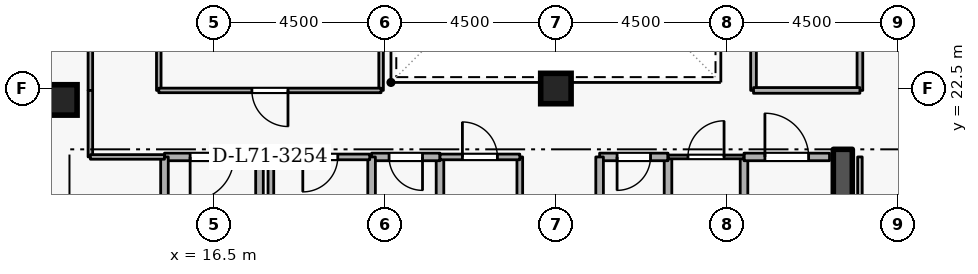
"""IFC4 building model, lengths in metres.
Left out: names, types, materials, properties, quantities, classifications, styles, units other than length and angle.
Written with IfcOpenShell. Run it as: python <this file> out.ifc"""

import sys

from ifc_helpers import new_model, si_unit, direction, frame, frame_2d, origin, origin_2d, place, context, subcontext, project, spatial, rectangle, extrude, element, fill, save


model = new_model("IFC4")
c1 = context("Model", 3, precision=1e-05, world=origin(), true_north=direction((0.0, 1.0)))
c2 = subcontext(c1, "Body", "Model", "MODEL_VIEW")
j1 = project(units=[si_unit("LENGTHUNIT", "METRE"), si_unit("PLANEANGLEUNIT", "RADIAN")], contexts=[c1])
p1 = place(None, origin())
s1 = spatial("IfcSite", under=j1, at=p1, CompositionType="ELEMENT")
p2 = place(p1, origin())
s2 = spatial("IfcBuilding", under=s1, at=p2, CompositionType="ELEMENT")
p3 = place(p2, frame((0.0, 0.0, 265.5)))
s3 = spatial("IfcBuildingStorey", under=s2, at=p3, CompositionType="ELEMENT", Elevation=265.5)
p4 = place(p3, frame((33.05, 15.1, 0.0), z_axis=(0.0, 0.0, 1.0), x_axis=(0.0, 1.0, 0.0)))
e1 = element("IfcWall", 1, at=p4, inside=s3, PredefinedType="SHEAR", context=c2, shape_type="SweptSolid", body=[
    extrude(rectangle(XDim=5.8, YDim=0.5, at=frame_2d((2.9, 0.0))), origin(), (0.0, 0.0, 1.0), 3.6),
])
for number, where, z_axis, x_axis in (
    (2, (12.5, 22.2, 0.0), (0.0, 0.0, 1.0), (1.0, 0.0, 0.0)),
    (3, (25.5, 22.5, 0.0), (0.0, 0.0, 1.0), (1.0, 0.0, 0.0)),
):
    element("IfcColumn", number, at=place(p3, frame(where, z_axis=z_axis, x_axis=x_axis)), inside=s3, PredefinedType="COLUMN", context=c2, shape_type="SweptSolid", body=[
        extrude(rectangle(XDim=0.8, YDim=0.8, at=origin_2d()), origin(), (0.0, 0.0, 1.0), 3.6),
    ])
p5 = place(p3, frame((17.7, 18.4, 0.0), z_axis=(0.0, 0.0, 1.0), x_axis=(0.0, 1.0, 0.0)))
e4 = element("IfcWall", 4, at=p5, inside=s3, PredefinedType="STANDARD", context=c2, shape_type="SweptSolid", body=[
    extrude(rectangle(XDim=2.3, YDim=0.2, at=frame_2d((1.15, 0.0))), origin(), (0.0, 0.0, 1.0), 2.545),
])
p6 = place(p3, frame((17.7, 20.7, 0.0), z_axis=(0.0, 0.0, 1.0), x_axis=(-1.0, 0.0, 0.0)))
e5 = element("IfcWall", 5, at=p6, inside=s3, PredefinedType="STANDARD", context=c2, shape_type="SweptSolid", body=[
    extrude(rectangle(XDim=2.5, YDim=0.2, at=frame_2d((1.25, 0.0))), origin(), (0.0, 0.0, 1.0), 3.34),
])
p7 = place(p6, frame((0.675, 0.0, 0.0)))
e6 = element("IfcOpeningElement", 6, at=p7, cuts=e5, PredefinedType="OPENING", context=c2, shape_type="SweptSolid", body=[
    extrude(rectangle(XDim=1.15, YDim=2.1, at=frame_2d((0.575, 1.05))), frame((0.0, 0.11, 0.0), z_axis=(0.0, -1.0, 0.0), x_axis=(1.0, 0.0, 0.0)), (0.0, 0.0, 1.0), 0.22),
])
p8 = place(p3, frame((15.2, 20.7, 0.0), z_axis=(0.0, 0.0, 1.0), x_axis=(0.0, -1.0, 0.0)))
e7 = element("IfcWall", 7, at=p8, inside=s3, PredefinedType="STANDARD", context=c2, shape_type="SweptSolid", body=[
    extrude(rectangle(XDim=5.7, YDim=0.2, at=frame_2d((2.85, 0.0))), origin(), (0.0, 0.0, 1.0), 3.34),
])
p9 = place(p3, frame((28.45, 18.65, 0.0), z_axis=(0.0, 0.0, 1.0), x_axis=(0.0, 1.0, 0.0)))
e8 = element("IfcWall", 8, at=p9, inside=s3, PredefinedType="STANDARD", context=c2, shape_type="SweptSolid", body=[
    extrude(rectangle(XDim=2.05, YDim=0.2, at=frame_2d((1.025, 0.0))), origin(), (0.0, 0.0, 1.0), 3.34),
])
p10 = place(p3, frame((28.45, 20.7, 0.0), z_axis=(0.0, 0.0, 1.0), x_axis=(-1.0, 0.0, 0.0)))
e9 = element("IfcWall", 9, at=p10, inside=s3, PredefinedType="STANDARD", context=c2, shape_type="SweptSolid", body=[
    extrude(rectangle(XDim=1.8, YDim=0.2, at=frame_2d((0.9, 0.0))), origin(), (0.0, 0.0, 1.0), 3.34),
])
p11 = place(p10, frame((0.46, 0.0, 0.0)))
e10 = element("IfcOpeningElement", 10, at=p11, cuts=e9, PredefinedType="OPENING", context=c2, shape_type="SweptSolid", body=[
    extrude(rectangle(XDim=0.88, YDim=2.04, at=frame_2d((0.44, 1.02))), frame((0.0, 0.11, 0.0), z_axis=(0.0, -1.0, 0.0), x_axis=(1.0, 0.0, 0.0)), (0.0, 0.0, 1.0), 0.22),
])
for number, where, z_axis, x_axis in (
    (11, (26.65, 20.7, 0.0), (0.0, 0.0, 1.0), (0.0, -1.0, 0.0)),
    (12, (22.45, 18.65, 0.0), (0.0, 0.0, 1.0), (0.0, 1.0, 0.0)),
):
    element("IfcWall", number, at=place(p3, frame(where, z_axis=z_axis, x_axis=x_axis)), inside=s3, PredefinedType="STANDARD", context=c2, shape_type="SweptSolid", body=[
        extrude(rectangle(XDim=2.05, YDim=0.2, at=frame_2d((1.025, 0.0))), origin(), (0.0, 0.0, 1.0), 3.34),
    ])
p12 = place(p3, frame((22.45, 20.7, 0.0), z_axis=(0.0, 0.0, 1.0), x_axis=(-1.0, 0.0, 0.0)))
e13 = element("IfcWall", 13, at=p12, inside=s3, PredefinedType="STANDARD", context=c2, shape_type="SweptSolid", body=[
    extrude(rectangle(XDim=1.8, YDim=0.2, at=frame_2d((0.9, 0.0))), origin(), (0.0, 0.0, 1.0), 3.34),
])
p13 = place(p12, frame((0.46, 0.0, 0.0)))
e14 = element("IfcOpeningElement", 14, at=p13, cuts=e13, PredefinedType="OPENING", context=c2, shape_type="SweptSolid", body=[
    extrude(rectangle(XDim=0.88, YDim=2.04, at=frame_2d((0.44, 1.02))), frame((0.0, 0.11, 0.0), z_axis=(0.0, -1.0, 0.0), x_axis=(1.0, 0.0, 0.0)), (0.0, 0.0, 1.0), 0.22),
])
for number, where, z_axis, x_axis in (
    (15, (20.65, 20.7, 0.0), (0.0, 0.0, 1.0), (0.0, -1.0, 0.0)),
    (16, (30.45, 18.65, 0.0), (0.0, 0.0, 1.0), (0.0, 1.0, 0.0)),
):
    element("IfcWall", number, at=place(p3, frame(where, z_axis=z_axis, x_axis=x_axis)), inside=s3, PredefinedType="STANDARD", context=c2, shape_type="SweptSolid", body=[
        extrude(rectangle(XDim=2.05, YDim=0.2, at=frame_2d((1.025, 0.0))), origin(), (0.0, 0.0, 1.0), 3.34),
    ])
p14 = place(p3, frame((30.45, 20.7, 0.0), z_axis=(0.0, 0.0, 1.0), x_axis=(1.0, 0.0, 0.0)))
e17 = element("IfcWall", 17, at=p14, inside=s3, PredefinedType="STANDARD", context=c2, shape_type="SweptSolid", body=[
    extrude(rectangle(XDim=2.25, YDim=0.2, at=frame_2d((1.125, 0.0))), origin(), (0.0, 0.0, 1.0), 3.34),
])
p15 = place(p14, frame((0.55, 0.0, 0.0)))
e18 = element("IfcOpeningElement", 18, at=p15, cuts=e17, PredefinedType="OPENING", context=c2, shape_type="SweptSolid", body=[
    extrude(rectangle(XDim=1.15, YDim=2.1, at=frame_2d((0.575, 1.05))), frame((0.0, 0.11, 0.0), z_axis=(0.0, -1.0, 0.0), x_axis=(1.0, 0.0, 0.0)), (0.0, 0.0, 1.0), 0.22),
])
p16 = place(p3, frame((20.6, 20.7, 0.0), z_axis=(0.0, 0.0, 1.0), x_axis=(-1.0, 0.0, 0.0)))
e19 = element("IfcWall", 19, at=p16, inside=s3, PredefinedType="PARTITIONING", context=c2, shape_type="SweptSolid", body=[
    extrude(rectangle(XDim=2.6, YDim=0.15, at=frame_2d((1.3, 0.0))), origin(), (0.0, 0.0, 1.0), 3.34),
])
p17 = place(p16, frame((0.84, 0.0, 0.0)))
e20 = element("IfcOpeningElement", 20, at=p17, cuts=e19, PredefinedType="OPENING", context=c2, shape_type="SweptSolid", body=[
    extrude(rectangle(XDim=0.92, YDim=2.08, at=frame_2d((0.46, 1.04))), frame((0.0, 0.085, 0.0), z_axis=(0.0, -1.0, 0.0), x_axis=(1.0, 0.0, 0.0)), (0.0, 0.0, 1.0), 0.17),
])
p18 = place(p3, frame((18.0, 20.7, 0.0), z_axis=(0.0, 0.0, 1.0), x_axis=(0.0, -1.0, 0.0)))
e21 = element("IfcWall", 21, at=p18, inside=s3, PredefinedType="PARTITIONING", context=c2, shape_type="SweptSolid", body=[
    extrude(rectangle(XDim=2.05, YDim=0.15, at=frame_2d((1.025, 0.0))), origin(), (0.0, 0.0, 1.0), 2.545),
])
p19 = place(p3, frame((24.55, 20.7, 0.0), z_axis=(0.0, 0.0, 1.0), x_axis=(0.0, -1.0, 0.0)))
e22 = element("IfcWall", 22, at=p19, inside=s3, PredefinedType="PARTITIONING", context=c2, shape_type="SweptSolid", body=[
    extrude(rectangle(XDim=2.05, YDim=0.15, at=frame_2d((1.025, 0.0))), origin(), (0.0, 0.0, 1.0), 3.34),
])
p20 = place(p3, frame((22.45, 20.7, 0.0), z_axis=(0.0, 0.0, 1.0), x_axis=(1.0, 0.0, 0.0)))
e23 = element("IfcWall", 23, at=p20, inside=s3, PredefinedType="PARTITIONING", context=c2, shape_type="SweptSolid", body=[
    extrude(rectangle(XDim=2.1, YDim=0.15, at=frame_2d((1.05, 0.0))), origin(), (0.0, 0.0, 1.0), 3.34),
])
p21 = place(p20, frame((0.59, 0.0, 0.0)))
e24 = element("IfcOpeningElement", 24, at=p21, cuts=e23, PredefinedType="OPENING", context=c2, shape_type="SweptSolid", body=[
    extrude(rectangle(XDim=0.92, YDim=2.08, at=frame_2d((0.46, 1.04))), frame((0.0, 0.085, 0.0), z_axis=(0.0, -1.0, 0.0), x_axis=(1.0, 0.0, 0.0)), (0.0, 0.0, 1.0), 0.17),
])
p22 = place(p3, frame((28.45, 20.7, 0.0), z_axis=(0.0, 0.0, 1.0), x_axis=(1.0, 0.0, 0.0)))
e25 = element("IfcWall", 25, at=p22, inside=s3, PredefinedType="PARTITIONING", context=c2, shape_type="SweptSolid", body=[
    extrude(rectangle(XDim=2.0, YDim=0.1, at=frame_2d((1.0, 0.0))), origin(), (0.0, 0.0, 1.0), 3.34),
])
p23 = place(p22, frame((0.525, 0.0, 0.0)))
e26 = element("IfcOpeningElement", 26, at=p23, cuts=e25, PredefinedType="OPENING", context=c2, shape_type="SweptSolid", body=[
    extrude(rectangle(XDim=0.95, YDim=2.1, at=frame_2d((0.475, 1.05))), frame((0.0, 0.06, 0.0), z_axis=(0.0, -1.0, 0.0), x_axis=(1.0, 0.0, 0.0)), (0.0, 0.0, 1.0), 0.12),
])
p24 = place(p3, frame((33.5, 20.7, 0.0), z_axis=(0.0, 0.0, 1.0), x_axis=(0.0, -1.0, 0.0)))
e27 = element("IfcWall", 27, at=p24, inside=s3, PredefinedType="PARTITIONING", context=c2, shape_type="SweptSolid", body=[
    extrude(rectangle(XDim=5.9, YDim=0.12, at=frame_2d((2.95, 0.0))), origin(), (0.0, 0.0, 1.0), 3.34),
])
p25 = place(p3, frame((13.25, 28.2, 0.0), z_axis=(0.0, 0.0, 1.0), x_axis=(0.0, -1.0, 0.0)))
e28 = element("IfcWall", 28, at=p25, inside=s3, PredefinedType="PARTITIONING", context=c2, shape_type="SweptSolid", body=[
    extrude(rectangle(XDim=5.75, YDim=0.12, at=frame_2d((2.875, 0.0))), origin(), (0.0, 0.0, 1.0), 3.34),
])
p26 = place(p25, frame((2.35, 0.0, 0.0)))
e29 = element("IfcOpeningElement", 29, at=p26, cuts=e28, PredefinedType="OPENING", context=c2, shape_type="SweptSolid", body=[
    extrude(rectangle(XDim=1.05, YDim=2.1, at=frame_2d((0.525, 1.05))), frame((0.0, 0.07, 0.0), z_axis=(0.0, -1.0, 0.0), x_axis=(1.0, 0.0, 0.0)), (0.0, 0.0, 1.0), 0.14),
])
p27 = place(p3, frame((13.25, 22.45, 0.0), z_axis=(0.0, 0.0, 1.0), x_axis=(0.0, -1.0, 0.0)))
e30 = element("IfcWall", 30, at=p27, inside=s3, PredefinedType="PARTITIONING", context=c2, shape_type="SweptSolid", body=[
    extrude(rectangle(XDim=1.75, YDim=0.12, at=frame_2d((0.875, 0.0))), origin(), (0.0, 0.0, 1.0), 3.34),
])
p28 = place(p3, frame((13.25, 20.7, 0.0), z_axis=(0.0, 0.0, 1.0), x_axis=(1.0, 0.0, 0.0)))
e31 = element("IfcWall", 31, at=p28, inside=s3, PredefinedType="PARTITIONING", context=c2, shape_type="SweptSolid", body=[
    extrude(rectangle(XDim=1.95, YDim=0.12, at=frame_2d((0.975, 0.0))), origin(), (0.0, 0.0, 1.0), 3.34),
])
for number, where, z_axis, x_axis in (
    (32, (15.05, 22.45, 0.0), (0.0, 0.0, 1.0), (0.0, 1.0, 0.0)),
    (33, (20.9, 28.2, 0.0), (0.0, 0.0, 1.0), (0.0, -1.0, 0.0)),
):
    element("IfcWall", number, at=place(p3, frame(where, z_axis=z_axis, x_axis=x_axis)), inside=s3, PredefinedType="PARTITIONING", context=c2, shape_type="SweptSolid", body=[
        extrude(rectangle(XDim=5.75, YDim=0.12, at=frame_2d((2.875, 0.0))), origin(), (0.0, 0.0, 1.0), 3.34),
    ])
p29 = place(p3, frame((20.9, 22.45, 0.0), z_axis=(0.0, 0.0, 1.0), x_axis=(-1.0, 0.0, 0.0)))
e34 = element("IfcWall", 34, at=p29, inside=s3, PredefinedType="PARTITIONING", context=c2, shape_type="SweptSolid", body=[
    extrude(rectangle(XDim=5.85, YDim=0.12, at=frame_2d((2.925, 0.0))), origin(), (0.0, 0.0, 1.0), 3.34),
])
p30 = place(p29, frame((2.45, 0.0, 0.0)))
e35 = element("IfcOpeningElement", 35, at=p30, cuts=e34, PredefinedType="OPENING", context=c2, shape_type="SweptSolid", body=[
    extrude(rectangle(XDim=0.95, YDim=2.1, at=frame_2d((0.475, 1.05))), frame((0.0, 0.07, 0.0), z_axis=(0.0, -1.0, 0.0), x_axis=(1.0, 0.0, 0.0)), (0.0, 0.0, 1.0), 0.14),
])
p31 = place(p3, frame((30.7, 22.45, 0.0), z_axis=(0.0, 0.0, 1.0), x_axis=(0.0, 1.0, 0.0)))
e36 = element("IfcWall", 36, at=p31, inside=s3, PredefinedType="PARTITIONING", context=c2, shape_type="SweptSolid", body=[
    extrude(rectangle(XDim=4.55, YDim=0.15, at=frame_2d((2.275, 0.0))), origin(), (0.0, 0.0, 1.0), 3.34),
])
p32 = place(p3, frame((33.5, 27.0, 0.0), z_axis=(0.0, 0.0, 1.0), x_axis=(0.0, -1.0, 0.0)))
e37 = element("IfcWall", 37, at=p32, inside=s3, PredefinedType="PARTITIONING", context=c2, shape_type="SweptSolid", body=[
    extrude(rectangle(XDim=4.55, YDim=0.15, at=frame_2d((2.275, 0.0))), origin(), (0.0, 0.0, 1.0), 3.34),
])
p33 = place(p32, frame((1.625, 0.0, 0.0)))
e38 = element("IfcOpeningElement", 38, at=p33, cuts=e37, PredefinedType="OPENING", context=c2, shape_type="SweptSolid", body=[
    extrude(rectangle(XDim=1.3, YDim=2.12, at=frame_2d((0.65, 1.06))), frame((0.0, 0.085, 0.0), z_axis=(0.0, -1.0, 0.0), x_axis=(1.0, 0.0, 0.0)), (0.0, 0.0, 1.0), 0.17),
])
p34 = place(p3, frame((33.5, 22.45, 0.0), z_axis=(0.0, 0.0, 1.0), x_axis=(-1.0, 0.0, 0.0)))
e39 = element("IfcWall", 39, at=p34, inside=s3, PredefinedType="PARTITIONING", context=c2, shape_type="SweptSolid", body=[
    extrude(rectangle(XDim=2.8, YDim=0.15, at=frame_2d((1.4, 0.0))), origin(), (0.0, 0.0, 1.0), 3.34),
])
p35 = place(p7, origin())
e40 = element("IfcDoor", 40, at=p35, inside=s3, OperationType="SINGLE_SWING_RIGHT", PredefinedType="DOOR", context=c2, shape_type="SweptSolid", body=[
    extrude(rectangle(XDim=1.15, YDim=2.1, at=frame_2d((0.575, 1.05))), frame((0.0, 0.025, 0.0), z_axis=(0.0, -1.0, 0.0), x_axis=(1.0, 0.0, 0.0)), (0.0, 0.0, 1.0), 0.05),
])
fill(e6, e40)
p36 = place(p11, origin())
e41 = element("IfcDoor", 41, at=p36, inside=s3, OperationType="SINGLE_SWING_RIGHT", PredefinedType="DOOR", context=c2, shape_type="SweptSolid", body=[
    extrude(rectangle(XDim=0.88, YDim=2.04, at=frame_2d((0.44, 1.02))), frame((0.0, 0.025, 0.0), z_axis=(0.0, -1.0, 0.0), x_axis=(1.0, 0.0, 0.0)), (0.0, 0.0, 1.0), 0.05),
])
fill(e10, e41)
p37 = place(p13, origin())
e42 = element("IfcDoor", 42, at=p37, inside=s3, OperationType="SINGLE_SWING_LEFT", PredefinedType="DOOR", context=c2, shape_type="SweptSolid", body=[
    extrude(rectangle(XDim=0.88, YDim=2.04, at=frame_2d((0.44, 1.02))), frame((0.0, 0.025, 0.0), z_axis=(0.0, -1.0, 0.0), x_axis=(1.0, 0.0, 0.0)), (0.0, 0.0, 1.0), 0.05),
])
fill(e14, e42)
p38 = place(p17, origin())
e43 = element("IfcDoor", 43, at=p38, inside=s3, OperationType="SINGLE_SWING_RIGHT", PredefinedType="DOOR", context=c2, shape_type="SweptSolid", body=[
    extrude(rectangle(XDim=0.92, YDim=2.08, at=frame_2d((0.46, 1.04))), frame((0.0, 0.025, 0.0), z_axis=(0.0, -1.0, 0.0), x_axis=(1.0, 0.0, 0.0)), (0.0, 0.0, 1.0), 0.05),
])
fill(e20, e43)
p39 = place(p21, origin())
e44 = element("IfcDoor", 44, at=p39, inside=s3, OperationType="SINGLE_SWING_LEFT", PredefinedType="DOOR", context=c2, shape_type="SweptSolid", body=[
    extrude(rectangle(XDim=0.92, YDim=2.08, at=frame_2d((0.46, 1.04))), frame((0.0, 0.025, 0.0), z_axis=(0.0, -1.0, 0.0), x_axis=(1.0, 0.0, 0.0)), (0.0, 0.0, 1.0), 0.05),
])
fill(e24, e44)
p40 = place(p23, origin())
e45 = element("IfcDoor", 45, at=p40, inside=s3, OperationType="SINGLE_SWING_RIGHT", PredefinedType="DOOR", context=c2, shape_type="SweptSolid", body=[
    extrude(rectangle(XDim=0.95, YDim=2.1, at=frame_2d((0.475, 1.05))), frame((0.0, 0.025, 0.0), z_axis=(0.0, -1.0, 0.0), x_axis=(1.0, 0.0, 0.0)), (0.0, 0.0, 1.0), 0.05),
])
fill(e26, e45)
p41 = place(p15, origin())
e46 = element("IfcDoor", 46, at=p41, inside=s3, OperationType="SINGLE_SWING_LEFT", PredefinedType="DOOR", context=c2, shape_type="SweptSolid", body=[
    extrude(rectangle(XDim=1.15, YDim=2.1, at=frame_2d((0.575, 1.05))), frame((0.0, 0.025, 0.0), z_axis=(0.0, -1.0, 0.0), x_axis=(1.0, 0.0, 0.0)), (0.0, 0.0, 1.0), 0.05),
])
fill(e18, e46)
p42 = place(p30, origin())
e47 = element("IfcDoor", 47, at=p42, inside=s3, OperationType="SINGLE_SWING_LEFT", PredefinedType="DOOR", context=c2, shape_type="SweptSolid", body=[
    extrude(rectangle(XDim=0.95, YDim=2.1, at=frame_2d((0.475, 1.05))), frame((0.0, 0.025, 0.0), z_axis=(0.0, -1.0, 0.0), x_axis=(1.0, 0.0, 0.0)), (0.0, 0.0, 1.0), 0.05),
])
fill(e35, e47)
save(model, sys.argv[1])
